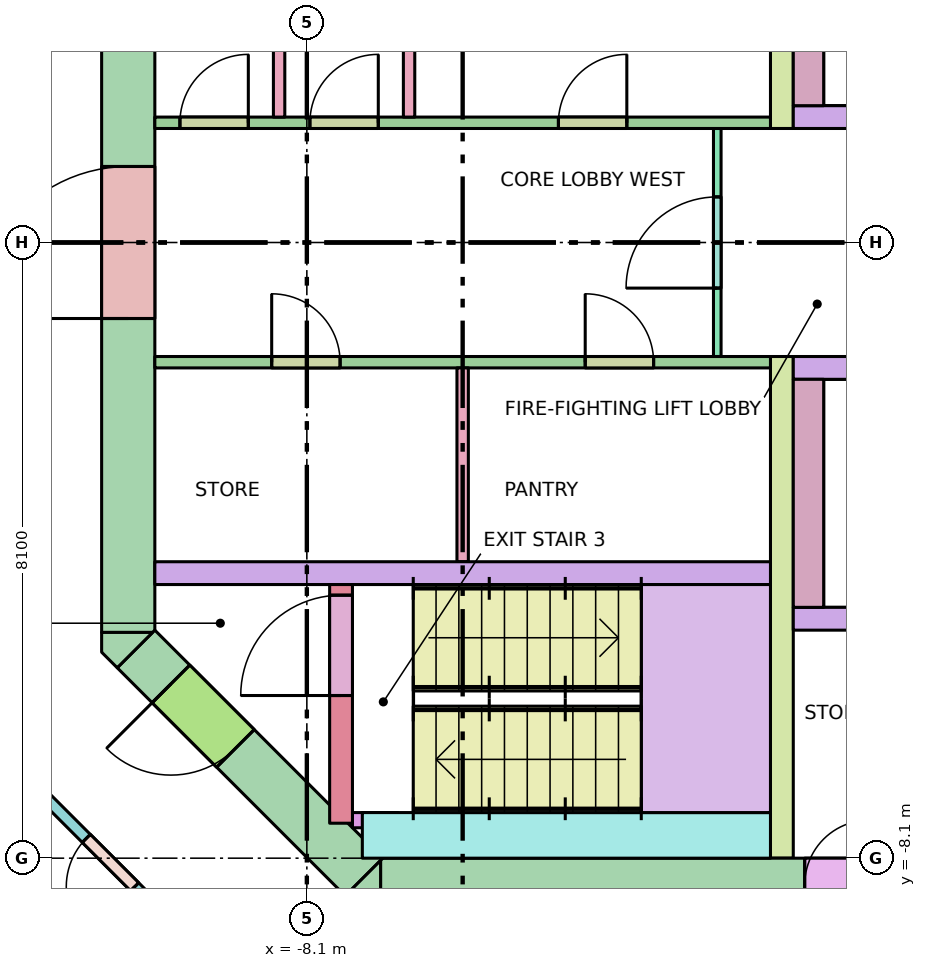
"""IFC4 building model, lengths in metres.
Left out: names, types, materials, properties, quantities, classifications, styles, units other than length and angle.
Written with IfcOpenShell. Run it as: python <this file> out.ifc"""

import sys

from ifc_helpers import new_model, si_unit, direction, frame, frame_2d, origin, place, context, subcontext, project, spatial, polyline, rectangle, outline, extrude, element, fill, save


model = new_model("IFC4")
c1 = context("Model", 3, precision=1e-05, world=origin(), true_north=direction((0.0, 1.0)))
c2 = subcontext(c1, "Body", "Model", "MODEL_VIEW")
j1 = project(units=[si_unit("LENGTHUNIT", "METRE"), si_unit("PLANEANGLEUNIT", "RADIAN")], contexts=[c1])
p1 = place(None, origin())
s1 = spatial("IfcSite", under=j1, at=p1, CompositionType="ELEMENT")
p2 = place(p1, origin())
s2 = spatial("IfcBuilding", under=s1, at=p2, CompositionType="ELEMENT")
p3 = place(p2, frame((0.0, 0.0, 165.3)))
s3 = spatial("IfcBuildingStorey", under=s2, at=p3, CompositionType="ELEMENT", Elevation=165.3)
p4 = place(p3, frame((-7.13, -8.45, -0.28), z_axis=(0.0, 0.0, 1.0), x_axis=(1.0, 0.0, 0.0)))
e1 = element("IfcWall", 1, at=p4, inside=s3, PredefinedType="SHEAR", context=c2, shape_type="SweptSolid", body=[
    extrude(rectangle(XDim=14.26, YDim=0.7, at=frame_2d((7.13, 0.0))), origin(), (0.0, 0.0, 1.0), 3.7),
])
p5 = place(p4, frame((8.08, 0.0, 0.28)))
e2 = element("IfcOpeningElement", 2, at=p5, cuts=e1, PredefinedType="OPENING", context=c2, shape_type="SweptSolid", body=[
    extrude(rectangle(XDim=0.7, YDim=2.1, at=frame_2d((0.35, 1.05))), frame((0.0, 0.36, 0.0), z_axis=(0.0, -1.0, 0.0), x_axis=(1.0, 0.0, 0.0)), (0.0, 0.0, 1.0), 0.72),
])
p6 = place(p4, frame((5.58, 0.0, 0.28)))
e3 = element("IfcOpeningElement", 3, at=p6, cuts=e1, PredefinedType="OPENING", context=c2, shape_type="SweptSolid", body=[
    extrude(rectangle(XDim=0.85, YDim=2.1, at=frame_2d((0.425, 1.05))), frame((0.0, 0.36, 0.0), z_axis=(0.0, -1.0, 0.0), x_axis=(1.0, 0.0, 0.0)), (0.0, 0.0, 1.0), 0.72),
])
p7 = place(p4, frame((6.88, 0.0, 0.28)))
e4 = element("IfcOpeningElement", 4, at=p7, cuts=e1, PredefinedType="OPENING", context=c2, shape_type="SweptSolid", body=[
    extrude(rectangle(XDim=0.85, YDim=2.1, at=frame_2d((0.425, 1.05))), frame((0.0, 0.36, 0.0), z_axis=(0.0, -1.0, 0.0), x_axis=(1.0, 0.0, 0.0)), (0.0, 0.0, 1.0), 0.72),
])
p8 = place(p4, frame((9.521, 0.0, 0.28)))
e5 = element("IfcOpeningElement", 5, at=p8, cuts=e1, PredefinedType="OPENING", context=c2, shape_type="SweptSolid", body=[
    extrude(rectangle(XDim=0.9, YDim=2.1, at=frame_2d((0.45, 1.05))), frame((0.0, 0.36, 0.0), z_axis=(0.0, -1.0, 0.0), x_axis=(1.0, 0.0, 0.0)), (0.0, 0.0, 1.0), 0.72),
])
p9 = place(p4, frame((11.278, 0.0, 0.28)))
e6 = element("IfcOpeningElement", 6, at=p9, cuts=e1, PredefinedType="OPENING", context=c2, shape_type="SweptSolid", body=[
    extrude(rectangle(XDim=0.9, YDim=2.1, at=frame_2d((0.45, 1.05))), frame((0.0, 0.36, 0.0), z_axis=(0.0, -1.0, 0.0), x_axis=(1.0, 0.0, 0.0)), (0.0, 0.0, 1.0), 0.72),
])
p10 = place(p4, frame((12.84, 0.0, 0.28)))
e7 = element("IfcOpeningElement", 7, at=p10, cuts=e1, PredefinedType="OPENING", context=c2, shape_type="SweptSolid", body=[
    extrude(rectangle(XDim=0.9, YDim=2.1, at=frame_2d((0.45, 1.05))), frame((0.0, 0.36, 0.0), z_axis=(0.0, -1.0, 0.0), x_axis=(1.0, 0.0, 0.0)), (0.0, 0.0, 1.0), 0.72),
])
p11 = place(p3, frame((-10.45, -5.13, -0.28), z_axis=(0.0, 0.0, 1.0), x_axis=(0.0, 1.0, 0.0)))
e8 = element("IfcWall", 8, at=p11, inside=s3, PredefinedType="SHEAR", context=c2, shape_type="SweptSolid", body=[
    extrude(rectangle(XDim=10.26, YDim=0.7, at=frame_2d((5.13, 0.0))), origin(), (0.0, 0.0, 1.0), 3.7),
])
p12 = place(p11, frame((4.13, 0.0, 0.28)))
e9 = element("IfcOpeningElement", 9, at=p12, cuts=e8, PredefinedType="OPENING", context=c2, shape_type="SweptSolid", body=[
    extrude(rectangle(XDim=2.0, YDim=2.1, at=frame_2d((1.0, 1.05))), frame((0.0, 0.36, 0.0), z_axis=(0.0, -1.0, 0.0), x_axis=(1.0, 0.0, 0.0)), (0.0, 0.0, 1.0), 0.72),
])
p13 = place(p3, frame((-7.347, -8.347, -0.28), z_axis=(0.0, 0.0, 1.0), x_axis=(-0.707106781187, 0.707106781187, 0.0)))
e10 = element("IfcWall", 10, at=p13, inside=s3, PredefinedType="SHEAR", context=c2, shape_type="SweptSolid", body=[
    extrude(rectangle(XDim=4.243, YDim=0.7, at=frame_2d((2.121, 0.0))), origin(), (0.0, 0.0, 1.0), 3.7),
])
p14 = place(p13, frame((2.393, 0.0, 0.28)))
e11 = element("IfcOpeningElement", 11, at=p14, cuts=e10, PredefinedType="OPENING", context=c2, shape_type="SweptSolid", body=[
    extrude(rectangle(XDim=1.2, YDim=2.1, at=frame_2d((0.6, 1.05))), frame((0.0, 0.36, 0.0), z_axis=(0.0, -1.0, 0.0), x_axis=(1.0, 0.0, 0.0)), (0.0, 0.0, 1.0), 0.72),
])
p15 = place(p3, frame((0.0, 0.0, -0.28)))
e12 = element("IfcWall", 12, at=p15, inside=s3, PredefinedType="SHEAR", context=c2, shape_type="SweptSolid", body=[
    extrude(outline(polyline([(-7.39, -8.8), (-7.595, -8.595), (-7.595, -8.595), (-7.595, -8.595), (-7.13, -8.13), (-7.13, -8.8), (-7.13, -8.8), (-7.39, -8.8)])), origin(), (0.0, 0.0, 1.0), 3.7),
])
p16 = place(p3, frame((0.0, 0.0, -0.28)))
e13 = element("IfcWall", 13, at=p16, inside=s3, PredefinedType="SHEAR", context=c2, shape_type="SweptSolid", body=[
    extrude(outline(polyline([(-10.8, -5.39), (-10.8, -5.13), (-10.8, -5.13), (-10.13, -5.13), (-10.595, -5.595), (-10.595, -5.595), (-10.595, -5.595), (-10.8, -5.39)])), origin(), (0.0, 0.0, 1.0), 3.7),
])
p17 = place(p3, frame((-10.1, -4.35, 0.0), z_axis=(0.0, 0.0, 1.0), x_axis=(1.0, 0.0, 0.0)))
e14 = element("IfcWall", 14, at=p17, inside=s3, PredefinedType="SOLIDWALL", context=c2, shape_type="SweptSolid", body=[
    extrude(rectangle(XDim=8.1, YDim=0.3, at=frame_2d((4.05, 0.0))), origin(), (0.0, 0.0, 1.0), 3.42),
])
for number, where, z_axis, x_axis in (
    (15, (-1.85, 1.5, 0.0), (0.0, 0.0, 1.0), (0.0, 1.0, 0.0)),
    (16, (-1.85, -8.1, 0.0), (0.0, 0.0, 1.0), (0.0, 1.0, 0.0)),
):
    element("IfcWall", number, at=place(p3, frame(where, z_axis=z_axis, x_axis=x_axis)), inside=s3, PredefinedType="SHEAR", context=c2, shape_type="SweptSolid", body=[
        extrude(rectangle(XDim=6.6, YDim=0.3, at=frame_2d((3.3, 0.0))), origin(), (0.0, 0.0, 1.0), 3.42),
    ])
p18 = place(p3, frame((-1.7, 1.65, 0.0), z_axis=(0.0, 0.0, 1.0), x_axis=(1.0, 0.0, 0.0)))
e17 = element("IfcWall", 17, at=p18, inside=s3, PredefinedType="SOLIDWALL", context=c2, shape_type="SweptSolid", body=[
    extrude(rectangle(XDim=3.4, YDim=0.3, at=frame_2d((1.7, 0.0))), origin(), (0.0, 0.0, 1.0), 3.42),
])
p19 = place(p18, frame((1.15, 0.0, 0.0)))
e18 = element("IfcOpeningElement", 18, at=p19, cuts=e17, PredefinedType="OPENING", context=c2, shape_type="SweptSolid", body=[
    extrude(rectangle(XDim=1.1, YDim=2.1, at=frame_2d((0.55, 1.05))), frame((0.0, 0.16, 0.0), z_axis=(0.0, -1.0, 0.0), x_axis=(1.0, 0.0, 0.0)), (0.0, 0.0, 1.0), 0.32),
])
p20 = place(p3, frame((-1.7, -1.65, 0.0), z_axis=(0.0, 0.0, 1.0), x_axis=(1.0, 0.0, 0.0)))
e19 = element("IfcWall", 19, at=p20, inside=s3, PredefinedType="SOLIDWALL", context=c2, shape_type="SweptSolid", body=[
    extrude(rectangle(XDim=3.4, YDim=0.3, at=frame_2d((1.7, 0.0))), origin(), (0.0, 0.0, 1.0), 3.42),
])
p21 = place(p20, frame((1.15, 0.0, 0.0)))
e20 = element("IfcOpeningElement", 20, at=p21, cuts=e19, PredefinedType="OPENING", context=c2, shape_type="SweptSolid", body=[
    extrude(rectangle(XDim=1.1, YDim=2.1, at=frame_2d((0.55, 1.05))), frame((0.0, 0.16, 0.0), z_axis=(0.0, -1.0, 0.0), x_axis=(1.0, 0.0, 0.0)), (0.0, 0.0, 1.0), 0.32),
])
for number, where, z_axis, x_axis in (
    (21, (-1.5, 1.8, 0.0), (0.0, 0.0, 1.0), (0.0, 1.0, 0.0)),
    (22, (-1.5, -4.8, 0.0), (0.0, 0.0, 1.0), (0.0, 1.0, 0.0)),
):
    element("IfcWall", number, at=place(p3, frame(where, z_axis=z_axis, x_axis=x_axis)), inside=s3, PredefinedType="SOLIDWALL", context=c2, shape_type="SweptSolid", body=[
        extrude(rectangle(XDim=3.0, YDim=0.4, at=frame_2d((1.5, 0.0))), origin(), (0.0, 0.0, 1.0), 3.42),
    ])
p22 = place(p3, frame((-1.7, -4.95, 0.0), z_axis=(0.0, 0.0, 1.0), x_axis=(1.0, 0.0, 0.0)))
e23 = element("IfcWall", 23, at=p22, inside=s3, PredefinedType="SOLIDWALL", context=c2, shape_type="SweptSolid", body=[
    extrude(rectangle(XDim=3.4, YDim=0.3, at=frame_2d((1.7, 0.0))), origin(), (0.0, 0.0, 1.0), 3.42),
])
p23 = place(p3, frame((-7.65, -7.64, 0.0), z_axis=(0.0, 0.0, 1.0), x_axis=(0.0, 1.0, 0.0)))
e24 = element("IfcWall", 24, at=p23, inside=s3, PredefinedType="SHEAR", context=c2, shape_type="SweptSolid", body=[
    extrude(rectangle(XDim=3.14, YDim=0.3, at=frame_2d((1.57, 0.0))), origin(), (0.0, 0.0, 1.0), 3.42),
])
p24 = place(p23, frame((1.68, 0.0, 0.0)))
e25 = element("IfcOpeningElement", 25, at=p24, cuts=e24, PredefinedType="OPENING", context=c2, shape_type="SweptSolid", body=[
    extrude(rectangle(XDim=1.32, YDim=2.1, at=frame_2d((0.66, 1.05))), frame((0.0, 0.16, 0.0), z_axis=(0.0, -1.0, 0.0), x_axis=(1.0, 0.0, 0.0)), (0.0, 0.0, 1.0), 0.32),
])
p25 = place(p3, frame((-7.5, -7.6, 0.0), z_axis=(0.0, 0.0, 1.0), x_axis=(1.0, 0.0, 0.0)))
e26 = element("IfcWall", 26, at=p25, inside=s3, PredefinedType="SHEAR", context=c2, shape_type="SweptSolid", body=[
    extrude(rectangle(XDim=0.6, YDim=0.2, at=frame_2d((0.3, 0.0))), origin(), (0.0, 0.0, 1.0), 3.42),
])
p26 = place(p3, frame((-7.37, -7.8, 0.0), z_axis=(0.0, 0.0, 1.0), x_axis=(1.0, 0.0, 0.0)))
e27 = element("IfcWall", 27, at=p26, inside=s3, PredefinedType="SHEAR", context=c2, shape_type="SweptSolid", body=[
    extrude(rectangle(XDim=5.37, YDim=0.6, at=frame_2d((2.685, 0.0))), origin(), (0.0, 0.0, 1.0), 3.42),
])
p27 = place(p3, frame((-2.7, -1.5, 0.0), z_axis=(0.0, 0.0, 1.0), x_axis=(0.0, 1.0, 0.0)))
e28 = element("IfcWall", 28, at=p27, inside=s3, PredefinedType="PARTITIONING", context=c2, shape_type="SweptSolid", body=[
    extrude(rectangle(XDim=3.0, YDim=0.1, at=frame_2d((1.5, 0.0))), origin(), (0.0, 0.0, 1.0), 3.42),
])
p28 = place(p27, frame((0.9, 0.0, 0.0)))
e29 = element("IfcOpeningElement", 29, at=p28, cuts=e28, PredefinedType="OPENING", context=c2, shape_type="SweptSolid", body=[
    extrude(rectangle(XDim=1.2, YDim=2.1, at=frame_2d((0.6, 1.05))), frame((0.0, 0.06, 0.0), z_axis=(0.0, -1.0, 0.0), x_axis=(1.0, 0.0, 0.0)), (0.0, 0.0, 1.0), 0.12),
])
for number, where, z_axis, x_axis in (
    (30, (-8.465, 1.65, 0.0), (0.0, 0.0, 1.0), (0.0, 1.0, 0.0)),
    (31, (-6.755, 1.65, 0.0), (0.0, 0.0, 1.0), (0.0, 1.0, 0.0)),
    (32, (-6.05, -4.2, 0.0), (0.0, 0.0, 1.0), (0.0, 1.0, 0.0)),
):
    element("IfcWall", number, at=place(p3, frame(where, z_axis=z_axis, x_axis=x_axis)), inside=s3, PredefinedType="PARTITIONING", context=c2, shape_type="SweptSolid", body=[
        extrude(rectangle(XDim=2.55, YDim=0.15, at=frame_2d((1.275, 0.0))), origin(), (0.0, 0.0, 1.0), 3.42),
    ])
p29 = place(p3, frame((-10.1, 1.575, 0.0), z_axis=(0.0, 0.0, 1.0), x_axis=(1.0, 0.0, 0.0)))
e33 = element("IfcWall", 33, at=p29, inside=s3, PredefinedType="PARTITIONING", context=c2, shape_type="SweptSolid", body=[
    extrude(rectangle(XDim=8.1, YDim=0.15, at=frame_2d((4.05, 0.0))), origin(), (0.0, 0.0, 1.0), 3.42),
])
p30 = place(p29, frame((0.33, 0.0, 0.0)))
e34 = element("IfcOpeningElement", 34, at=p30, cuts=e33, PredefinedType="OPENING", context=c2, shape_type="SweptSolid", body=[
    extrude(rectangle(XDim=0.9, YDim=2.1, at=frame_2d((0.45, 1.05))), frame((0.0, 0.085, 0.0), z_axis=(0.0, -1.0, 0.0), x_axis=(1.0, 0.0, 0.0)), (0.0, 0.0, 1.0), 0.17),
])
p31 = place(p29, frame((2.04, 0.0, 0.0)))
e35 = element("IfcOpeningElement", 35, at=p31, cuts=e33, PredefinedType="OPENING", context=c2, shape_type="SweptSolid", body=[
    extrude(rectangle(XDim=0.9, YDim=2.1, at=frame_2d((0.45, 1.05))), frame((0.0, 0.085, 0.0), z_axis=(0.0, -1.0, 0.0), x_axis=(1.0, 0.0, 0.0)), (0.0, 0.0, 1.0), 0.17),
])
p32 = place(p29, frame((5.31, 0.0, 0.0)))
e36 = element("IfcOpeningElement", 36, at=p32, cuts=e33, PredefinedType="OPENING", context=c2, shape_type="SweptSolid", body=[
    extrude(rectangle(XDim=0.9, YDim=2.1, at=frame_2d((0.45, 1.05))), frame((0.0, 0.085, 0.0), z_axis=(0.0, -1.0, 0.0), x_axis=(1.0, 0.0, 0.0)), (0.0, 0.0, 1.0), 0.17),
])
p33 = place(p3, frame((-10.1, -1.575, 0.0), z_axis=(0.0, 0.0, 1.0), x_axis=(1.0, 0.0, 0.0)))
e37 = element("IfcWall", 37, at=p33, inside=s3, PredefinedType="PARTITIONING", context=c2, shape_type="SweptSolid", body=[
    extrude(rectangle(XDim=8.1, YDim=0.15, at=frame_2d((4.05, 0.0))), origin(), (0.0, 0.0, 1.0), 3.42),
])
p34 = place(p33, frame((1.538, 0.0, 0.0)))
e38 = element("IfcOpeningElement", 38, at=p34, cuts=e37, PredefinedType="OPENING", context=c2, shape_type="SweptSolid", body=[
    extrude(rectangle(XDim=0.9, YDim=2.1, at=frame_2d((0.45, 1.05))), frame((0.0, 0.085, 0.0), z_axis=(0.0, -1.0, 0.0), x_axis=(1.0, 0.0, 0.0)), (0.0, 0.0, 1.0), 0.17),
])
p35 = place(p33, frame((5.663, 0.0, 0.0)))
e39 = element("IfcOpeningElement", 39, at=p35, cuts=e37, PredefinedType="OPENING", context=c2, shape_type="SweptSolid", body=[
    extrude(rectangle(XDim=0.9, YDim=2.1, at=frame_2d((0.45, 1.05))), frame((0.0, 0.085, 0.0), z_axis=(0.0, -1.0, 0.0), x_axis=(1.0, 0.0, 0.0)), (0.0, 0.0, 1.0), 0.17),
])
p36 = place(p3, frame((-8.204, -10.638, 0.0), z_axis=(0.0, 0.0, 1.0), x_axis=(-0.707106781187, 0.707106781187, 0.0)))
e40 = element("IfcWall", 40, at=p36, inside=s3, PredefinedType="PARTITIONING", context=c2, shape_type="SweptSolid", body=[
    extrude(rectangle(XDim=6.271, YDim=0.15, at=frame_2d((3.135, 0.0))), origin(), (0.0, 0.0, 1.0), 2.62),
])
p37 = place(p36, frame((3.057, 0.0, 0.0)))
e41 = element("IfcOpeningElement", 41, at=p37, cuts=e40, PredefinedType="OPENING", context=c2, shape_type="SweptSolid", body=[
    extrude(rectangle(XDim=0.9, YDim=2.1, at=frame_2d((0.45, 1.05))), frame((0.0, 0.085, 0.0), z_axis=(0.0, -1.0, 0.0), x_axis=(1.0, 0.0, 0.0)), (0.0, 0.0, 1.0), 0.17),
])
p38 = place(p36, frame((0.436, 0.0, 0.0)))
e42 = element("IfcOpeningElement", 42, at=p38, cuts=e40, PredefinedType="OPENING", context=c2, shape_type="SweptSolid", body=[
    extrude(rectangle(XDim=0.9, YDim=2.1, at=frame_2d((0.45, 1.05))), frame((0.0, 0.085, 0.0), z_axis=(0.0, -1.0, 0.0), x_axis=(1.0, 0.0, 0.0)), (0.0, 0.0, 1.0), 0.17),
])
p39 = place(p24, origin())
e43 = element("IfcDoor", 43, at=p39, inside=s3, OperationType="DOUBLE_DOOR_SINGLE_SWING", PredefinedType="DOOR", context=c2, shape_type="SweptSolid", body=[
    extrude(rectangle(XDim=1.32, YDim=2.1, at=frame_2d((0.66, 1.05))), frame((0.0, 0.025, 0.0), z_axis=(0.0, -1.0, 0.0), x_axis=(1.0, 0.0, 0.0)), (0.0, 0.0, 1.0), 0.05),
])
fill(e25, e43)
p40 = place(p14, origin())
e44 = element("IfcDoor", 44, at=p40, inside=s3, OperationType="SINGLE_SWING_RIGHT", PredefinedType="DOOR", context=c2, shape_type="SweptSolid", body=[
    extrude(rectangle(XDim=1.2, YDim=2.1, at=frame_2d((0.6, 1.05))), frame((0.0, 0.025, 0.0), z_axis=(0.0, -1.0, 0.0), x_axis=(1.0, 0.0, 0.0)), (0.0, 0.0, 1.0), 0.05),
])
fill(e11, e44)
p41 = place(p12, origin())
e45 = element("IfcDoor", 45, at=p41, inside=s3, OperationType="DOUBLE_DOOR_SINGLE_SWING", PredefinedType="DOOR", context=c2, shape_type="SweptSolid", body=[
    extrude(rectangle(XDim=2.0, YDim=2.1, at=frame_2d((1.0, 1.05))), frame((0.0, 0.025, 0.0), z_axis=(0.0, -1.0, 0.0), x_axis=(1.0, 0.0, 0.0)), (0.0, 0.0, 1.0), 0.05),
])
fill(e9, e45)
p42 = place(p28, origin())
e46 = element("IfcDoor", 46, at=p42, inside=s3, OperationType="SINGLE_SWING_LEFT", PredefinedType="DOOR", context=c2, shape_type="SweptSolid", body=[
    extrude(rectangle(XDim=1.2, YDim=2.1, at=frame_2d((0.6, 1.05))), frame((0.0, 0.025, 0.0), z_axis=(0.0, -1.0, 0.0), x_axis=(1.0, 0.0, 0.0)), (0.0, 0.0, 1.0), 0.05),
])
fill(e29, e46)
p43 = place(p6, origin())
e47 = element("IfcDoor", 47, at=p43, inside=s3, OperationType="SINGLE_SWING_RIGHT", PredefinedType="DOOR", context=c2, shape_type="SweptSolid", body=[
    extrude(rectangle(XDim=0.85, YDim=2.1, at=frame_2d((0.425, 1.05))), frame((0.0, 0.025, 0.0), z_axis=(0.0, -1.0, 0.0), x_axis=(1.0, 0.0, 0.0)), (0.0, 0.0, 1.0), 0.05),
])
fill(e3, e47)
p44 = place(p30, origin())
e48 = element("IfcDoor", 48, at=p44, inside=s3, OperationType="SINGLE_SWING_RIGHT", PredefinedType="DOOR", context=c2, shape_type="SweptSolid", body=[
    extrude(rectangle(XDim=0.9, YDim=2.1, at=frame_2d((0.45, 1.05))), frame((0.0, 0.025, 0.0), z_axis=(0.0, -1.0, 0.0), x_axis=(1.0, 0.0, 0.0)), (0.0, 0.0, 1.0), 0.05),
])
fill(e34, e48)
p45 = place(p31, origin())
e49 = element("IfcDoor", 49, at=p45, inside=s3, OperationType="SINGLE_SWING_RIGHT", PredefinedType="DOOR", context=c2, shape_type="SweptSolid", body=[
    extrude(rectangle(XDim=0.9, YDim=2.1, at=frame_2d((0.45, 1.05))), frame((0.0, 0.025, 0.0), z_axis=(0.0, -1.0, 0.0), x_axis=(1.0, 0.0, 0.0)), (0.0, 0.0, 1.0), 0.05),
])
fill(e35, e49)
p46 = place(p32, origin())
e50 = element("IfcDoor", 50, at=p46, inside=s3, OperationType="SINGLE_SWING_RIGHT", PredefinedType="DOOR", context=c2, shape_type="SweptSolid", body=[
    extrude(rectangle(XDim=0.9, YDim=2.1, at=frame_2d((0.45, 1.05))), frame((0.0, 0.025, 0.0), z_axis=(0.0, -1.0, 0.0), x_axis=(1.0, 0.0, 0.0)), (0.0, 0.0, 1.0), 0.05),
])
fill(e36, e50)
p47 = place(p34, origin())
e51 = element("IfcDoor", 51, at=p47, inside=s3, OperationType="SINGLE_SWING_LEFT", PredefinedType="DOOR", context=c2, shape_type="SweptSolid", body=[
    extrude(rectangle(XDim=0.9, YDim=2.1, at=frame_2d((0.45, 1.05))), frame((0.0, 0.025, 0.0), z_axis=(0.0, -1.0, 0.0), x_axis=(1.0, 0.0, 0.0)), (0.0, 0.0, 1.0), 0.05),
])
fill(e38, e51)
p48 = place(p35, origin())
e52 = element("IfcDoor", 52, at=p48, inside=s3, OperationType="SINGLE_SWING_LEFT", PredefinedType="DOOR", context=c2, shape_type="SweptSolid", body=[
    extrude(rectangle(XDim=0.9, YDim=2.1, at=frame_2d((0.45, 1.05))), frame((0.0, 0.025, 0.0), z_axis=(0.0, -1.0, 0.0), x_axis=(1.0, 0.0, 0.0)), (0.0, 0.0, 1.0), 0.05),
])
fill(e39, e52)
p49 = place(p37, origin())
e53 = element("IfcDoor", 53, at=p49, inside=s3, OperationType="SINGLE_SWING_LEFT", PredefinedType="DOOR", context=c2, shape_type="SweptSolid", body=[
    extrude(rectangle(XDim=0.9, YDim=2.1, at=frame_2d((0.45, 1.05))), frame((0.0, 0.025, 0.0), z_axis=(0.0, -1.0, 0.0), x_axis=(1.0, 0.0, 0.0)), (0.0, 0.0, 1.0), 0.05),
])
fill(e41, e53)
save(model, sys.argv[1])
